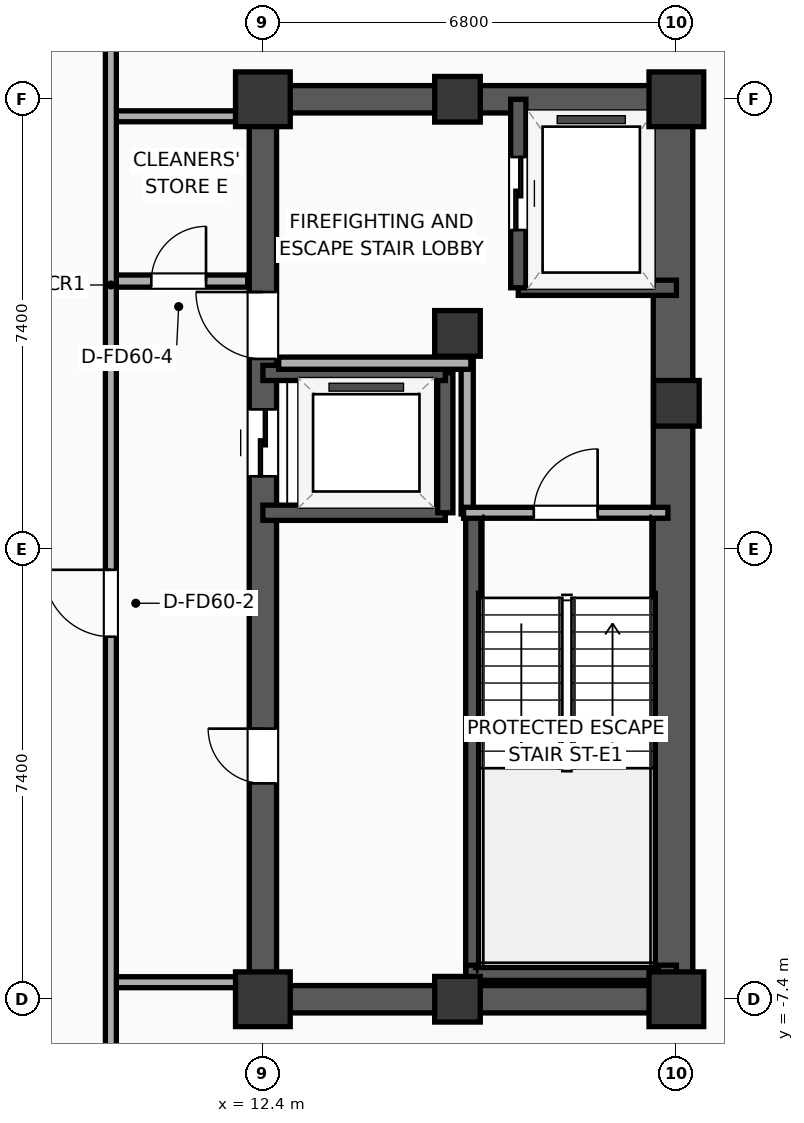
"""IFC4 building model, lengths in metres.
Left out: names, types, materials, properties, quantities, classifications, styles, units other than length and angle.
Written with IfcOpenShell. Run it as: python <this file> out.ifc"""

import sys

from ifc_helpers import new_model, si_unit, direction, frame, frame_2d, origin, origin_2d, place, context, subcontext, project, spatial, rectangle, extrude, element, fill, save


model = new_model("IFC4")
c1 = context("Model", 3, precision=1e-05, world=origin(), true_north=direction((0.0, 1.0)))
c2 = subcontext(c1, "Body", "Model", "MODEL_VIEW")
j1 = project(units=[si_unit("LENGTHUNIT", "METRE"), si_unit("PLANEANGLEUNIT", "RADIAN")], contexts=[c1])
p1 = place(None, origin())
s1 = spatial("IfcSite", under=j1, at=p1, CompositionType="ELEMENT")
p2 = place(p1, origin())
s2 = spatial("IfcBuilding", under=s1, at=p2, CompositionType="ELEMENT")
p3 = place(p2, frame((0.0, 0.0, 208.0)))
s3 = spatial("IfcBuildingStorey", under=s2, at=p3, CompositionType="ELEMENT", Elevation=208.0)
p4 = place(p3, frame((12.4, -7.4, 0.0), z_axis=(0.0, 0.0, 1.0), x_axis=(1.0, 0.0, 0.0)))
e1 = element("IfcColumn", 1, at=p4, inside=s3, PredefinedType="COLUMN", context=c2, shape_type="SweptSolid", body=[
    extrude(rectangle(XDim=0.9, YDim=0.9, at=origin_2d()), origin(), (0.0, 0.0, 1.0), 3.9),
])
p5 = place(p3, frame((15.6, 3.55, 0.0), z_axis=(0.0, 0.0, 1.0), x_axis=(1.0, 0.0, 0.0)))
e2 = element("IfcColumn", 2, at=p5, inside=s3, PredefinedType="COLUMN", context=c2, shape_type="SweptSolid", body=[
    extrude(rectangle(XDim=0.75, YDim=0.75, at=origin_2d()), origin(), (0.0, 0.0, 1.0), 3.9),
])
p6 = place(p3, frame((12.4, 7.4, 0.0), z_axis=(0.0, 0.0, 1.0), x_axis=(1.0, 0.0, 0.0)))
e3 = element("IfcColumn", 3, at=p6, inside=s3, PredefinedType="COLUMN", context=c2, shape_type="SweptSolid", body=[
    extrude(rectangle(XDim=0.9, YDim=0.9, at=origin_2d()), origin(), (0.0, 0.0, 1.0), 3.9),
])
for number, where, z_axis, x_axis in (
    (4, (15.6, -7.4, 0.0), (0.0, 0.0, 1.0), (1.0, 0.0, 0.0)),
    (5, (15.6, 7.4, 0.0), (0.0, 0.0, 1.0), (1.0, 0.0, 0.0)),
):
    element("IfcColumn", number, at=place(p3, frame(where, z_axis=z_axis, x_axis=x_axis)), inside=s3, PredefinedType="COLUMN", context=c2, shape_type="SweptSolid", body=[
        extrude(rectangle(XDim=0.75, YDim=0.75, at=origin_2d()), origin(), (0.0, 0.0, 1.0), 3.9),
    ])
p7 = place(p3, frame((19.2, -7.4, 0.0), z_axis=(0.0, 0.0, 1.0), x_axis=(1.0, 0.0, 0.0)))
e6 = element("IfcColumn", 6, at=p7, inside=s3, PredefinedType="COLUMN", context=c2, shape_type="SweptSolid", body=[
    extrude(rectangle(XDim=0.9, YDim=0.9, at=origin_2d()), origin(), (0.0, 0.0, 1.0), 3.9),
])
p8 = place(p3, frame((19.2, 2.4, 0.0), z_axis=(0.0, 0.0, 1.0), x_axis=(1.0, 0.0, 0.0)))
e7 = element("IfcColumn", 7, at=p8, inside=s3, PredefinedType="COLUMN", context=c2, shape_type="SweptSolid", body=[
    extrude(rectangle(XDim=0.75, YDim=0.75, at=origin_2d()), origin(), (0.0, 0.0, 1.0), 3.9),
])
p9 = place(p3, frame((19.2, 7.4, 0.0), z_axis=(0.0, 0.0, 1.0), x_axis=(1.0, 0.0, 0.0)))
e8 = element("IfcColumn", 8, at=p9, inside=s3, PredefinedType="COLUMN", context=c2, shape_type="SweptSolid", body=[
    extrude(rectangle(XDim=0.9, YDim=0.9, at=origin_2d()), origin(), (0.0, 0.0, 1.0), 3.9),
])
for number, where, z_axis, x_axis in (
    (9, (12.175, -7.4, 0.0), (0.0, 0.0, 1.0), (1.0, 0.0, 0.0)),
    (10, (12.175, 7.4, 0.0), (0.0, 0.0, 1.0), (1.0, 0.0, 0.0)),
):
    element("IfcWall", number, at=place(p3, frame(where, z_axis=z_axis, x_axis=x_axis)), inside=s3, PredefinedType="SHEAR", context=c2, shape_type="SweptSolid", body=[
        extrude(rectangle(XDim=7.25, YDim=0.45, at=frame_2d((3.625, 0.0))), origin(), (0.0, 0.0, 1.0), 3.65),
    ])
p10 = place(p3, frame((12.4, -7.4, 0.0), z_axis=(0.0, 0.0, 1.0), x_axis=(0.0, 1.0, 0.0)))
e11 = element("IfcWall", 11, at=p10, inside=s3, PredefinedType="SHEAR", context=c2, shape_type="SweptSolid", body=[
    extrude(rectangle(XDim=14.8, YDim=0.45, at=frame_2d((7.4, 0.0))), origin(), (0.0, 0.0, 1.0), 3.65),
])
p11 = place(p10, frame((8.6, 0.0, 0.0)))
e12 = element("IfcOpeningElement", 12, at=p11, cuts=e11, PredefinedType="OPENING", context=c2, shape_type="SweptSolid", body=[
    extrude(rectangle(XDim=1.1, YDim=2.05, at=frame_2d((0.55, 1.025))), frame((0.0, 0.235, 0.0), z_axis=(0.0, -1.0, 0.0), x_axis=(1.0, 0.0, 0.0)), (0.0, 0.0, 1.0), 0.47),
])
p12 = place(p10, frame((10.53, 0.0, 0.0)))
e13 = element("IfcOpeningElement", 13, at=p12, cuts=e11, PredefinedType="OPENING", context=c2, shape_type="SweptSolid", body=[
    extrude(rectangle(XDim=1.1, YDim=2.05, at=frame_2d((0.55, 1.025))), frame((0.0, 0.235, 0.0), z_axis=(0.0, -1.0, 0.0), x_axis=(1.0, 0.0, 0.0)), (0.0, 0.0, 1.0), 0.47),
])
p13 = place(p10, frame((3.55, 0.0, 0.0)))
e14 = element("IfcOpeningElement", 14, at=p13, cuts=e11, PredefinedType="OPENING", context=c2, shape_type="SweptSolid", body=[
    extrude(rectangle(XDim=0.9, YDim=2.05, at=frame_2d((0.45, 1.025))), frame((0.0, 0.235, 0.0), z_axis=(0.0, -1.0, 0.0), x_axis=(1.0, 0.0, 0.0)), (0.0, 0.0, 1.0), 0.47),
])
p14 = place(p3, frame((19.145, -7.4, 0.0), z_axis=(0.0, 0.0, 1.0), x_axis=(0.0, 1.0, 0.0)))
e15 = element("IfcWall", 15, at=p14, inside=s3, PredefinedType="SHEAR", context=c2, shape_type="SweptSolid", body=[
    extrude(rectangle(XDim=14.8, YDim=0.65, at=frame_2d((7.4, 0.0))), origin(), (0.0, 0.0, 1.0), 3.65),
])
p15 = place(p3, frame((15.86, -7.085, 0.0), z_axis=(0.0, 0.0, 1.0), x_axis=(0.0, 1.0, 0.0)))
e16 = element("IfcWall", 16, at=p15, inside=s3, PredefinedType="SOLIDWALL", context=c2, shape_type="SweptSolid", body=[
    extrude(rectangle(XDim=7.685, YDim=0.25, at=frame_2d((3.843, 0.0))), origin(), (0.0, 0.0, 1.0), 3.65),
])
p16 = place(p3, frame((15.74, -6.965, 0.0), z_axis=(0.0, 0.0, 1.0), x_axis=(1.0, 0.0, 0.0)))
e17 = element("IfcWall", 17, at=p16, inside=s3, PredefinedType="SOLIDWALL", context=c2, shape_type="SweptSolid", body=[
    extrude(rectangle(XDim=3.46, YDim=0.25, at=frame_2d((1.73, 0.0))), origin(), (0.0, 0.0, 1.0), 3.65),
])
p17 = place(p3, frame((16.6, 4.3, 0.0), z_axis=(0.0, 0.0, 1.0), x_axis=(1.0, 0.0, 0.0)))
e18 = element("IfcWall", 18, at=p17, inside=s3, PredefinedType="SOLIDWALL", context=c2, shape_type="SweptSolid", body=[
    extrude(rectangle(XDim=2.6, YDim=0.25, at=frame_2d((1.3, 0.0))), origin(), (0.0, 0.0, 1.0), 3.65),
])
p18 = place(p3, frame((16.6, 7.4, 0.0), z_axis=(0.0, 0.0, 1.0), x_axis=(0.0, -1.0, 0.0)))
e19 = element("IfcWall", 19, at=p18, inside=s3, PredefinedType="SOLIDWALL", context=c2, shape_type="SweptSolid", body=[
    extrude(rectangle(XDim=3.1, YDim=0.25, at=frame_2d((1.55, 0.0))), origin(), (0.0, 0.0, 1.0), 3.65),
])
p19 = place(p18, frame((0.95, 0.0, 0.0)))
e20 = element("IfcOpeningElement", 20, at=p19, cuts=e19, PredefinedType="OPENING", context=c2, shape_type="SweptSolid", body=[
    extrude(rectangle(XDim=1.2, YDim=2.05, at=frame_2d((0.6, 1.025))), frame((0.0, 0.135, 0.0), z_axis=(0.0, -1.0, 0.0), x_axis=(1.0, 0.0, 0.0)), (0.0, 0.0, 1.0), 0.27),
])
p20 = place(p3, frame((12.4, 0.6, 0.0), z_axis=(0.0, 0.0, 1.0), x_axis=(1.0, 0.0, 0.0)))
e21 = element("IfcWall", 21, at=p20, inside=s3, PredefinedType="SOLIDWALL", context=c2, shape_type="SweptSolid", body=[
    extrude(rectangle(XDim=3.0, YDim=0.25, at=frame_2d((1.5, 0.0))), origin(), (0.0, 0.0, 1.0), 3.65),
])
p21 = place(p3, frame((15.4, 0.6, 0.0), z_axis=(0.0, 0.0, 1.0), x_axis=(0.0, 1.0, 0.0)))
e22 = element("IfcWall", 22, at=p21, inside=s3, PredefinedType="SOLIDWALL", context=c2, shape_type="SweptSolid", body=[
    extrude(rectangle(XDim=2.3, YDim=0.25, at=frame_2d((1.15, 0.0))), origin(), (0.0, 0.0, 1.0), 3.65),
])
p22 = place(p3, frame((15.4, 2.9, 0.0), z_axis=(0.0, 0.0, 1.0), x_axis=(-1.0, 0.0, 0.0)))
e23 = element("IfcWall", 23, at=p22, inside=s3, PredefinedType="SOLIDWALL", context=c2, shape_type="SweptSolid", body=[
    extrude(rectangle(XDim=3.0, YDim=0.25, at=frame_2d((1.5, 0.0))), origin(), (0.0, 0.0, 1.0), 3.65),
])
p23 = place(p3, frame((15.76, 0.58, 0.0), z_axis=(0.0, 0.0, 1.0), x_axis=(0.0, 1.0, 0.0)))
e24 = element("IfcWall", 24, at=p23, inside=s3, PredefinedType="PARTITIONING", context=c2, shape_type="SweptSolid", body=[
    extrude(rectangle(XDim=2.52, YDim=0.2, at=frame_2d((1.26, 0.0))), origin(), (0.0, 0.0, 1.0), 3.65),
])
p24 = place(p3, frame((12.66, 3.06, 0.0), z_axis=(0.0, 0.0, 1.0), x_axis=(1.0, 0.0, 0.0)))
e25 = element("IfcWall", 25, at=p24, inside=s3, PredefinedType="PARTITIONING", context=c2, shape_type="SweptSolid", body=[
    extrude(rectangle(XDim=3.16, YDim=0.2, at=frame_2d((1.58, 0.0))), origin(), (0.0, 0.0, 1.0), 3.65),
])
p25 = place(p3, frame((15.7, 0.6, 0.0), z_axis=(0.0, 0.0, 1.0), x_axis=(1.0, 0.0, 0.0)))
e26 = element("IfcWall", 26, at=p25, inside=s3, PredefinedType="PARTITIONING", context=c2, shape_type="SweptSolid", body=[
    extrude(rectangle(XDim=3.36, YDim=0.18, at=frame_2d((1.68, 0.0))), origin(), (0.0, 0.0, 1.0), 3.65),
])
p26 = place(p25, frame((1.155, 0.0, 0.0)))
e27 = element("IfcOpeningElement", 27, at=p26, cuts=e26, PredefinedType="OPENING", context=c2, shape_type="SweptSolid", body=[
    extrude(rectangle(XDim=1.05, YDim=2.05, at=frame_2d((0.525, 1.025))), frame((0.0, 0.1, 0.0), z_axis=(0.0, -1.0, 0.0), x_axis=(1.0, 0.0, 0.0)), (0.0, 0.0, 1.0), 0.2),
])
p27 = place(p3, frame((9.88, 4.41, 0.0), z_axis=(0.0, 0.0, 1.0), x_axis=(1.0, 0.0, 0.0)))
e28 = element("IfcWall", 28, at=p27, inside=s3, PredefinedType="PARTITIONING", context=c2, shape_type="SweptSolid", body=[
    extrude(rectangle(XDim=2.27, YDim=0.2, at=frame_2d((1.135, 0.0))), origin(), (0.0, 0.0, 1.0), 3.65),
])
p28 = place(p27, frame((0.685, 0.0, 0.0)))
e29 = element("IfcOpeningElement", 29, at=p28, cuts=e28, PredefinedType="OPENING", context=c2, shape_type="SweptSolid", body=[
    extrude(rectangle(XDim=0.9, YDim=2.05, at=frame_2d((0.45, 1.025))), frame((0.0, 0.11, 0.0), z_axis=(0.0, -1.0, 0.0), x_axis=(1.0, 0.0, 0.0)), (0.0, 0.0, 1.0), 0.22),
])
for number, where, z_axis, x_axis in (
    (30, (9.88, 7.12, 0.0), (0.0, 0.0, 1.0), (1.0, 0.0, 0.0)),
    (31, (9.88, -7.12, 0.0), (0.0, 0.0, 1.0), (1.0, 0.0, 0.0)),
):
    element("IfcWall", number, at=place(p3, frame(where, z_axis=z_axis, x_axis=x_axis)), inside=s3, PredefinedType="PARTITIONING", context=c2, shape_type="SweptSolid", body=[
        extrude(rectangle(XDim=2.27, YDim=0.18, at=frame_2d((1.135, 0.0))), origin(), (0.0, 0.0, 1.0), 3.65),
    ])
p29 = place(p3, frame((9.9, -8.88, 0.0), z_axis=(0.0, 0.0, 1.0), x_axis=(0.0, 1.0, 0.0)))
e32 = element("IfcWall", 32, at=p29, inside=s3, PredefinedType="PARTITIONING", context=c2, shape_type="SweptSolid", body=[
    extrude(rectangle(XDim=17.76, YDim=0.18, at=frame_2d((8.88, 0.0))), origin(), (0.0, 0.0, 1.0), 3.65),
])
p30 = place(p29, frame((7.442, 0.0, 0.0)))
e33 = element("IfcOpeningElement", 33, at=p30, cuts=e32, PredefinedType="OPENING", context=c2, shape_type="SweptSolid", body=[
    extrude(rectangle(XDim=1.1, YDim=2.05, at=frame_2d((0.55, 1.025))), frame((0.0, 0.1, 0.0), z_axis=(0.0, -1.0, 0.0), x_axis=(1.0, 0.0, 0.0)), (0.0, 0.0, 1.0), 0.2),
])
p31 = place(p19, origin())
e34 = element("IfcDoor", 34, at=p31, inside=s3, OperationType="SLIDING_TO_LEFT", PredefinedType="DOOR", context=c2, shape_type="SweptSolid", body=[
    extrude(rectangle(XDim=1.2, YDim=2.05, at=frame_2d((0.6, 1.025))), frame((0.0, 0.025, 0.0), z_axis=(0.0, -1.0, 0.0), x_axis=(1.0, 0.0, 0.0)), (0.0, 0.0, 1.0), 0.05),
])
fill(e20, e34)
p32 = place(p11, origin())
e35 = element("IfcDoor", 35, at=p32, inside=s3, OperationType="SLIDING_TO_LEFT", PredefinedType="DOOR", context=c2, shape_type="SweptSolid", body=[
    extrude(rectangle(XDim=1.1, YDim=2.05, at=frame_2d((0.55, 1.025))), frame((0.0, 0.025, 0.0), z_axis=(0.0, -1.0, 0.0), x_axis=(1.0, 0.0, 0.0)), (0.0, 0.0, 1.0), 0.05),
])
fill(e12, e35)
p33 = place(p26, origin())
e36 = element("IfcDoor", 36, at=p33, inside=s3, OperationType="SINGLE_SWING_RIGHT", PredefinedType="DOOR", context=c2, shape_type="SweptSolid", body=[
    extrude(rectangle(XDim=1.05, YDim=2.05, at=frame_2d((0.525, 1.025))), frame((0.0, 0.025, 0.0), z_axis=(0.0, -1.0, 0.0), x_axis=(1.0, 0.0, 0.0)), (0.0, 0.0, 1.0), 0.05),
])
fill(e27, e36)
p34 = place(p28, origin())
e37 = element("IfcDoor", 37, at=p34, inside=s3, OperationType="SINGLE_SWING_RIGHT", PredefinedType="DOOR", context=c2, shape_type="SweptSolid", body=[
    extrude(rectangle(XDim=0.9, YDim=2.05, at=frame_2d((0.45, 1.025))), frame((0.0, 0.025, 0.0), z_axis=(0.0, -1.0, 0.0), x_axis=(1.0, 0.0, 0.0)), (0.0, 0.0, 1.0), 0.05),
])
fill(e29, e37)
p35 = place(p30, origin())
e38 = element("IfcDoor", 38, at=p35, inside=s3, OperationType="SINGLE_SWING_RIGHT", PredefinedType="DOOR", context=c2, shape_type="SweptSolid", body=[
    extrude(rectangle(XDim=1.1, YDim=2.05, at=frame_2d((0.55, 1.025))), frame((0.0, 0.025, 0.0), z_axis=(0.0, -1.0, 0.0), x_axis=(1.0, 0.0, 0.0)), (0.0, 0.0, 1.0), 0.05),
])
fill(e33, e38)
p36 = place(p12, origin())
e39 = element("IfcDoor", 39, at=p36, inside=s3, OperationType="SINGLE_SWING_RIGHT", PredefinedType="DOOR", context=c2, shape_type="SweptSolid", body=[
    extrude(rectangle(XDim=1.1, YDim=2.05, at=frame_2d((0.55, 1.025))), frame((0.0, 0.025, 0.0), z_axis=(0.0, -1.0, 0.0), x_axis=(1.0, 0.0, 0.0)), (0.0, 0.0, 1.0), 0.05),
])
fill(e13, e39)
p37 = place(p13, origin())
e40 = element("IfcDoor", 40, at=p37, inside=s3, OperationType="SINGLE_SWING_RIGHT", PredefinedType="DOOR", context=c2, shape_type="SweptSolid", body=[
    extrude(rectangle(XDim=0.9, YDim=2.05, at=frame_2d((0.45, 1.025))), frame((0.0, 0.025, 0.0), z_axis=(0.0, -1.0, 0.0), x_axis=(1.0, 0.0, 0.0)), (0.0, 0.0, 1.0), 0.05),
])
fill(e14, e40)
save(model, sys.argv[1])
